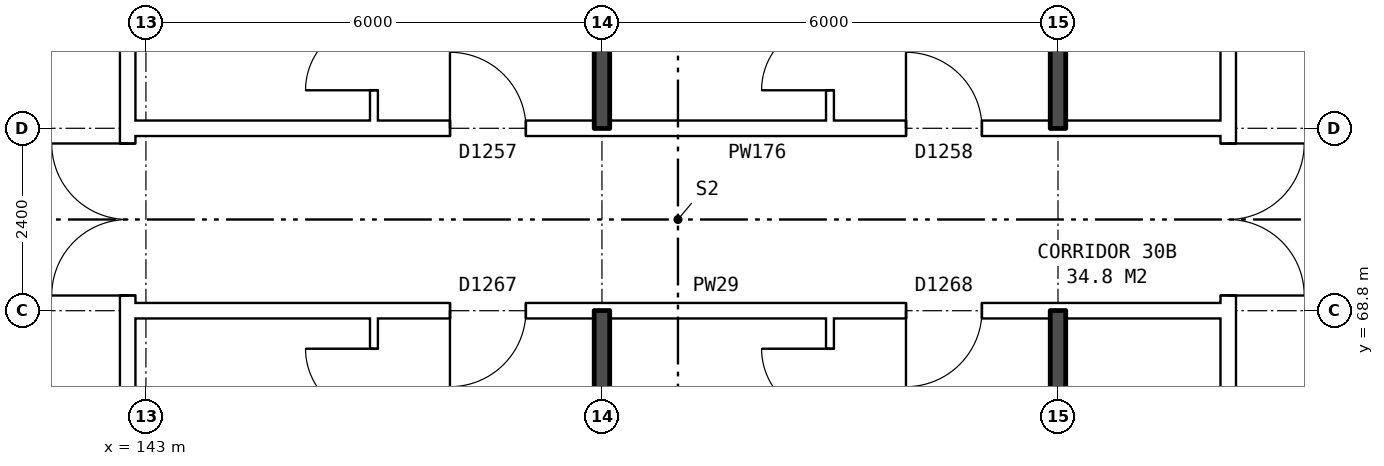
"""IFC4 building model, lengths in metres.
Left out: names, types, materials, properties, quantities, classifications, styles, units other than length and angle.
Written with IfcOpenShell. Run it as: python <this file> out.ifc"""

import sys

from ifc_helpers import new_model, si_unit, direction, frame, frame_2d, origin, place, context, subcontext, project, spatial, rectangle, extrude, element, fill, save


model = new_model("IFC4")
c1 = context("Model", 3, precision=1e-05, world=origin(), true_north=direction((0.0, 1.0)))
c2 = subcontext(c1, "Body", "Model", "MODEL_VIEW")
j1 = project(units=[si_unit("LENGTHUNIT", "METRE"), si_unit("PLANEANGLEUNIT", "RADIAN")], contexts=[c1])
p1 = place(None, origin())
s1 = spatial("IfcSite", under=j1, at=p1, CompositionType="ELEMENT")
p2 = place(p1, origin())
s2 = spatial("IfcBuilding", under=s1, at=p2, CompositionType="ELEMENT")
p3 = place(p2, frame((0.0, 0.0, 108.8)))
s3 = spatial("IfcBuildingStorey", under=s2, at=p3, CompositionType="ELEMENT", Elevation=108.8)
p4 = place(p3, frame((142.76, 63.9, 0.0), z_axis=(0.0, 0.0, 1.0), x_axis=(0.0, 1.0, 0.0)))
e1 = element("IfcWall", 1, at=p4, inside=s3, PredefinedType="PARTITIONING", context=c2, shape_type="SweptSolid", body=[
    extrude(rectangle(XDim=12.2, YDim=0.2, at=frame_2d((6.1, 0.0))), origin(), (0.0, 0.0, 1.0), 2.85),
])
p5 = place(p4, frame((5.1, 0.0, 0.0)))
e2 = element("IfcOpeningElement", 2, at=p5, cuts=e1, PredefinedType="OPENING", context=c2, shape_type="SweptSolid", body=[
    extrude(rectangle(XDim=2.0, YDim=2.1, at=frame_2d((1.0, 1.05))), frame((0.0, 0.11, 0.0), z_axis=(0.0, -1.0, 0.0), x_axis=(1.0, 0.0, 0.0)), (0.0, 0.0, 1.0), 0.22),
])
p6 = place(p3, frame((157.24, 63.9, 0.0), z_axis=(0.0, 0.0, 1.0), x_axis=(0.0, 1.0, 0.0)))
e3 = element("IfcWall", 3, at=p6, inside=s3, PredefinedType="PARTITIONING", context=c2, shape_type="SweptSolid", body=[
    extrude(rectangle(XDim=12.2, YDim=0.2, at=frame_2d((6.1, 0.0))), origin(), (0.0, 0.0, 1.0), 2.85),
])
p7 = place(p6, frame((5.1, 0.0, 0.0)))
e4 = element("IfcOpeningElement", 4, at=p7, cuts=e3, PredefinedType="OPENING", context=c2, shape_type="SweptSolid", body=[
    extrude(rectangle(XDim=2.0, YDim=2.1, at=frame_2d((1.0, 1.05))), frame((0.0, 0.11, 0.0), z_axis=(0.0, -1.0, 0.0), x_axis=(1.0, 0.0, 0.0)), (0.0, 0.0, 1.0), 0.22),
])
p8 = place(p3, frame((142.76, 68.8, 0.0), z_axis=(0.0, 0.0, 1.0), x_axis=(1.0, 0.0, 0.0)))
e5 = element("IfcWall", 5, at=p8, inside=s3, PredefinedType="PARTITIONING", context=c2, shape_type="SweptSolid", body=[
    extrude(rectangle(XDim=14.48, YDim=0.2, at=frame_2d((7.24, 0.0))), origin(), (0.0, 0.0, 1.0), 2.85),
])
p9 = place(p8, frame((4.24, 0.0, 0.0)))
e6 = element("IfcOpeningElement", 6, at=p9, cuts=e5, PredefinedType="OPENING", context=c2, shape_type="SweptSolid", body=[
    extrude(rectangle(XDim=1.0, YDim=2.1, at=frame_2d((0.5, 1.05))), frame((0.0, 0.11, 0.0), z_axis=(0.0, -1.0, 0.0), x_axis=(1.0, 0.0, 0.0)), (0.0, 0.0, 1.0), 0.22),
])
p10 = place(p8, frame((10.24, 0.0, 0.0)))
e7 = element("IfcOpeningElement", 7, at=p10, cuts=e5, PredefinedType="OPENING", context=c2, shape_type="SweptSolid", body=[
    extrude(rectangle(XDim=1.0, YDim=2.1, at=frame_2d((0.5, 1.05))), frame((0.0, 0.11, 0.0), z_axis=(0.0, -1.0, 0.0), x_axis=(1.0, 0.0, 0.0)), (0.0, 0.0, 1.0), 0.22),
])
p11 = place(p3, frame((142.76, 71.2, 0.0), z_axis=(0.0, 0.0, 1.0), x_axis=(1.0, 0.0, 0.0)))
e8 = element("IfcWall", 8, at=p11, inside=s3, PredefinedType="PARTITIONING", context=c2, shape_type="SweptSolid", body=[
    extrude(rectangle(XDim=14.48, YDim=0.2, at=frame_2d((7.24, 0.0))), origin(), (0.0, 0.0, 1.0), 2.85),
])
p12 = place(p11, frame((4.24, 0.0, 0.0)))
e9 = element("IfcOpeningElement", 9, at=p12, cuts=e8, PredefinedType="OPENING", context=c2, shape_type="SweptSolid", body=[
    extrude(rectangle(XDim=1.0, YDim=2.1, at=frame_2d((0.5, 1.05))), frame((0.0, 0.11, 0.0), z_axis=(0.0, -1.0, 0.0), x_axis=(1.0, 0.0, 0.0)), (0.0, 0.0, 1.0), 0.22),
])
p13 = place(p11, frame((10.24, 0.0, 0.0)))
e10 = element("IfcOpeningElement", 10, at=p13, cuts=e8, PredefinedType="OPENING", context=c2, shape_type="SweptSolid", body=[
    extrude(rectangle(XDim=1.0, YDim=2.1, at=frame_2d((0.5, 1.05))), frame((0.0, 0.11, 0.0), z_axis=(0.0, -1.0, 0.0), x_axis=(1.0, 0.0, 0.0)), (0.0, 0.0, 1.0), 0.22),
])
p14 = place(p3, frame((146.0, 54.36, 0.0), z_axis=(0.0, 0.0, 1.0), x_axis=(0.0, 1.0, 0.0)))
e11 = element("IfcWall", 11, at=p14, inside=s3, PredefinedType="PARTITIONING", context=c2, shape_type="SweptSolid", body=[
    extrude(rectangle(XDim=14.34, YDim=0.1, at=frame_2d((7.17, 0.0))), origin(), (0.0, 0.0, 1.0), 2.85),
])
p15 = place(p14, frame((7.7, 0.0, 0.0)))
e12 = element("IfcOpeningElement", 12, at=p15, cuts=e11, PredefinedType="OPENING", context=c2, shape_type="SweptSolid", body=[
    extrude(rectangle(XDim=0.9, YDim=2.1, at=frame_2d((0.45, 1.05))), frame((0.0, 0.06, 0.0), z_axis=(0.0, -1.0, 0.0), x_axis=(1.0, 0.0, 0.0)), (0.0, 0.0, 1.0), 0.12),
])
p16 = place(p14, frame((13.04, 0.0, 0.0)))
e13 = element("IfcOpeningElement", 13, at=p16, cuts=e11, PredefinedType="OPENING", context=c2, shape_type="SweptSolid", body=[
    extrude(rectangle(XDim=0.9, YDim=2.1, at=frame_2d((0.45, 1.05))), frame((0.0, 0.06, 0.0), z_axis=(0.0, -1.0, 0.0), x_axis=(1.0, 0.0, 0.0)), (0.0, 0.0, 1.0), 0.12),
])
p17 = place(p3, frame((146.0, 71.3, 0.0), z_axis=(0.0, 0.0, 1.0), x_axis=(0.0, 1.0, 0.0)))
e14 = element("IfcWall", 14, at=p17, inside=s3, PredefinedType="PARTITIONING", context=c2, shape_type="SweptSolid", body=[
    extrude(rectangle(XDim=14.34, YDim=0.1, at=frame_2d((7.17, 0.0))), origin(), (0.0, 0.0, 1.0), 2.85),
])
p18 = place(p17, frame((7.94, 0.0, 0.0)))
e15 = element("IfcOpeningElement", 15, at=p18, cuts=e14, PredefinedType="OPENING", context=c2, shape_type="SweptSolid", body=[
    extrude(rectangle(XDim=0.9, YDim=2.1, at=frame_2d((0.45, 1.05))), frame((0.0, 0.06, 0.0), z_axis=(0.0, -1.0, 0.0), x_axis=(1.0, 0.0, 0.0)), (0.0, 0.0, 1.0), 0.12),
])
p19 = place(p17, frame((0.4, 0.0, 0.0)))
e16 = element("IfcOpeningElement", 16, at=p19, cuts=e14, PredefinedType="OPENING", context=c2, shape_type="SweptSolid", body=[
    extrude(rectangle(XDim=0.9, YDim=2.1, at=frame_2d((0.45, 1.05))), frame((0.0, 0.06, 0.0), z_axis=(0.0, -1.0, 0.0), x_axis=(1.0, 0.0, 0.0)), (0.0, 0.0, 1.0), 0.12),
])
for number, where, z_axis, x_axis in (
    (17, (149.0, 54.36, 0.0), (0.0, 0.0, 1.0), (0.0, 1.0, 0.0)),
    (18, (149.0, 71.2, 0.0), (0.0, 0.0, 1.0), (0.0, 1.0, 0.0)),
):
    element("IfcWall", number, at=place(p3, frame(where, z_axis=z_axis, x_axis=x_axis)), inside=s3, PredefinedType="SOLIDWALL", context=c2, shape_type="SweptSolid", body=[
        extrude(rectangle(XDim=14.44, YDim=0.2, at=frame_2d((7.22, 0.0))), origin(), (0.0, 0.0, 1.0), 2.85),
    ])
p20 = place(p3, frame((152.0, 54.36, 0.0), z_axis=(0.0, 0.0, 1.0), x_axis=(0.0, 1.0, 0.0)))
e19 = element("IfcWall", 19, at=p20, inside=s3, PredefinedType="PARTITIONING", context=c2, shape_type="SweptSolid", body=[
    extrude(rectangle(XDim=14.34, YDim=0.1, at=frame_2d((7.17, 0.0))), origin(), (0.0, 0.0, 1.0), 2.85),
])
p21 = place(p20, frame((7.7, 0.0, 0.0)))
e20 = element("IfcOpeningElement", 20, at=p21, cuts=e19, PredefinedType="OPENING", context=c2, shape_type="SweptSolid", body=[
    extrude(rectangle(XDim=0.9, YDim=2.1, at=frame_2d((0.45, 1.05))), frame((0.0, 0.06, 0.0), z_axis=(0.0, -1.0, 0.0), x_axis=(1.0, 0.0, 0.0)), (0.0, 0.0, 1.0), 0.12),
])
p22 = place(p20, frame((13.04, 0.0, 0.0)))
e21 = element("IfcOpeningElement", 21, at=p22, cuts=e19, PredefinedType="OPENING", context=c2, shape_type="SweptSolid", body=[
    extrude(rectangle(XDim=0.9, YDim=2.1, at=frame_2d((0.45, 1.05))), frame((0.0, 0.06, 0.0), z_axis=(0.0, -1.0, 0.0), x_axis=(1.0, 0.0, 0.0)), (0.0, 0.0, 1.0), 0.12),
])
p23 = place(p3, frame((152.0, 71.3, 0.0), z_axis=(0.0, 0.0, 1.0), x_axis=(0.0, 1.0, 0.0)))
e22 = element("IfcWall", 22, at=p23, inside=s3, PredefinedType="PARTITIONING", context=c2, shape_type="SweptSolid", body=[
    extrude(rectangle(XDim=14.34, YDim=0.1, at=frame_2d((7.17, 0.0))), origin(), (0.0, 0.0, 1.0), 2.85),
])
p24 = place(p23, frame((9.24, 0.0, 0.0)))
e23 = element("IfcOpeningElement", 23, at=p24, cuts=e22, PredefinedType="OPENING", context=c2, shape_type="SweptSolid", body=[
    extrude(rectangle(XDim=0.9, YDim=2.1, at=frame_2d((0.45, 1.05))), frame((0.0, 0.06, 0.0), z_axis=(0.0, -1.0, 0.0), x_axis=(1.0, 0.0, 0.0)), (0.0, 0.0, 1.0), 0.12),
])
p25 = place(p23, frame((0.4, 0.0, 0.0)))
e24 = element("IfcOpeningElement", 24, at=p25, cuts=e22, PredefinedType="OPENING", context=c2, shape_type="SweptSolid", body=[
    extrude(rectangle(XDim=0.9, YDim=2.1, at=frame_2d((0.45, 1.05))), frame((0.0, 0.06, 0.0), z_axis=(0.0, -1.0, 0.0), x_axis=(1.0, 0.0, 0.0)), (0.0, 0.0, 1.0), 0.12),
])
for number, where, z_axis, x_axis in (
    (25, (155.0, 63.8, 0.0), (0.0, 0.0, 1.0), (0.0, 1.0, 0.0)),
    (26, (155.0, 71.2, 0.0), (0.0, 0.0, 1.0), (0.0, 1.0, 0.0)),
):
    element("IfcWall", number, at=place(p3, frame(where, z_axis=z_axis, x_axis=x_axis)), inside=s3, PredefinedType="SOLIDWALL", context=c2, shape_type="SweptSolid", body=[
        extrude(rectangle(XDim=5.0, YDim=0.2, at=frame_2d((2.5, 0.0))), origin(), (0.0, 0.0, 1.0), 2.85),
    ])
p26 = place(p5, origin())
e27 = element("IfcDoor", 27, at=p26, inside=s3, OperationType="DOUBLE_DOOR_SINGLE_SWING", PredefinedType="DOOR", context=c2, shape_type="SweptSolid", body=[
    extrude(rectangle(XDim=2.0, YDim=2.1, at=frame_2d((1.0, 1.05))), frame((0.0, 0.025, 0.0), z_axis=(0.0, -1.0, 0.0), x_axis=(1.0, 0.0, 0.0)), (0.0, 0.0, 1.0), 0.05),
])
fill(e2, e27)
p27 = place(p7, frame((2.0, 0.0, 0.0), z_axis=(0.0, 0.0, 1.0), x_axis=(-1.0, 0.0, 0.0)))
e28 = element("IfcDoor", 28, at=p27, inside=s3, OperationType="DOUBLE_DOOR_SINGLE_SWING", PredefinedType="DOOR", context=c2, shape_type="SweptSolid", body=[
    extrude(rectangle(XDim=2.0, YDim=2.1, at=frame_2d((1.0, 1.05))), frame((0.0, 0.025, 0.0), z_axis=(0.0, -1.0, 0.0), x_axis=(1.0, 0.0, 0.0)), (0.0, 0.0, 1.0), 0.05),
])
fill(e4, e28)
p28 = place(p9, frame((1.0, 0.0, 0.0), z_axis=(0.0, 0.0, 1.0), x_axis=(-1.0, 0.0, 0.0)))
e29 = element("IfcDoor", 29, at=p28, inside=s3, OperationType="SINGLE_SWING_RIGHT", PredefinedType="DOOR", context=c2, shape_type="SweptSolid", body=[
    extrude(rectangle(XDim=1.0, YDim=2.1, at=frame_2d((0.5, 1.05))), frame((0.0, 0.025, 0.0), z_axis=(0.0, -1.0, 0.0), x_axis=(1.0, 0.0, 0.0)), (0.0, 0.0, 1.0), 0.05),
])
fill(e6, e29)
p29 = place(p16, origin())
e30 = element("IfcDoor", 30, at=p29, inside=s3, OperationType="SINGLE_SWING_RIGHT", PredefinedType="DOOR", context=c2, shape_type="SweptSolid", body=[
    extrude(rectangle(XDim=0.9, YDim=2.1, at=frame_2d((0.45, 1.05))), frame((0.0, 0.025, 0.0), z_axis=(0.0, -1.0, 0.0), x_axis=(1.0, 0.0, 0.0)), (0.0, 0.0, 1.0), 0.05),
])
fill(e13, e30)
p30 = place(p10, frame((1.0, 0.0, 0.0), z_axis=(0.0, 0.0, 1.0), x_axis=(-1.0, 0.0, 0.0)))
e31 = element("IfcDoor", 31, at=p30, inside=s3, OperationType="SINGLE_SWING_RIGHT", PredefinedType="DOOR", context=c2, shape_type="SweptSolid", body=[
    extrude(rectangle(XDim=1.0, YDim=2.1, at=frame_2d((0.5, 1.05))), frame((0.0, 0.025, 0.0), z_axis=(0.0, -1.0, 0.0), x_axis=(1.0, 0.0, 0.0)), (0.0, 0.0, 1.0), 0.05),
])
fill(e7, e31)
p31 = place(p22, origin())
e32 = element("IfcDoor", 32, at=p31, inside=s3, OperationType="SINGLE_SWING_RIGHT", PredefinedType="DOOR", context=c2, shape_type="SweptSolid", body=[
    extrude(rectangle(XDim=0.9, YDim=2.1, at=frame_2d((0.45, 1.05))), frame((0.0, 0.025, 0.0), z_axis=(0.0, -1.0, 0.0), x_axis=(1.0, 0.0, 0.0)), (0.0, 0.0, 1.0), 0.05),
])
fill(e21, e32)
p32 = place(p12, origin())
e33 = element("IfcDoor", 33, at=p32, inside=s3, OperationType="SINGLE_SWING_LEFT", PredefinedType="DOOR", context=c2, shape_type="SweptSolid", body=[
    extrude(rectangle(XDim=1.0, YDim=2.1, at=frame_2d((0.5, 1.05))), frame((0.0, 0.025, 0.0), z_axis=(0.0, -1.0, 0.0), x_axis=(1.0, 0.0, 0.0)), (0.0, 0.0, 1.0), 0.05),
])
fill(e9, e33)
p33 = place(p19, origin())
e34 = element("IfcDoor", 34, at=p33, inside=s3, OperationType="SINGLE_SWING_LEFT", PredefinedType="DOOR", context=c2, shape_type="SweptSolid", body=[
    extrude(rectangle(XDim=0.9, YDim=2.1, at=frame_2d((0.45, 1.05))), frame((0.0, 0.025, 0.0), z_axis=(0.0, -1.0, 0.0), x_axis=(1.0, 0.0, 0.0)), (0.0, 0.0, 1.0), 0.05),
])
fill(e16, e34)
p34 = place(p13, origin())
e35 = element("IfcDoor", 35, at=p34, inside=s3, OperationType="SINGLE_SWING_LEFT", PredefinedType="DOOR", context=c2, shape_type="SweptSolid", body=[
    extrude(rectangle(XDim=1.0, YDim=2.1, at=frame_2d((0.5, 1.05))), frame((0.0, 0.025, 0.0), z_axis=(0.0, -1.0, 0.0), x_axis=(1.0, 0.0, 0.0)), (0.0, 0.0, 1.0), 0.05),
])
fill(e10, e35)
p35 = place(p25, origin())
e36 = element("IfcDoor", 36, at=p35, inside=s3, OperationType="SINGLE_SWING_LEFT", PredefinedType="DOOR", context=c2, shape_type="SweptSolid", body=[
    extrude(rectangle(XDim=0.9, YDim=2.1, at=frame_2d((0.45, 1.05))), frame((0.0, 0.025, 0.0), z_axis=(0.0, -1.0, 0.0), x_axis=(1.0, 0.0, 0.0)), (0.0, 0.0, 1.0), 0.05),
])
fill(e24, e36)
save(model, sys.argv[1])
